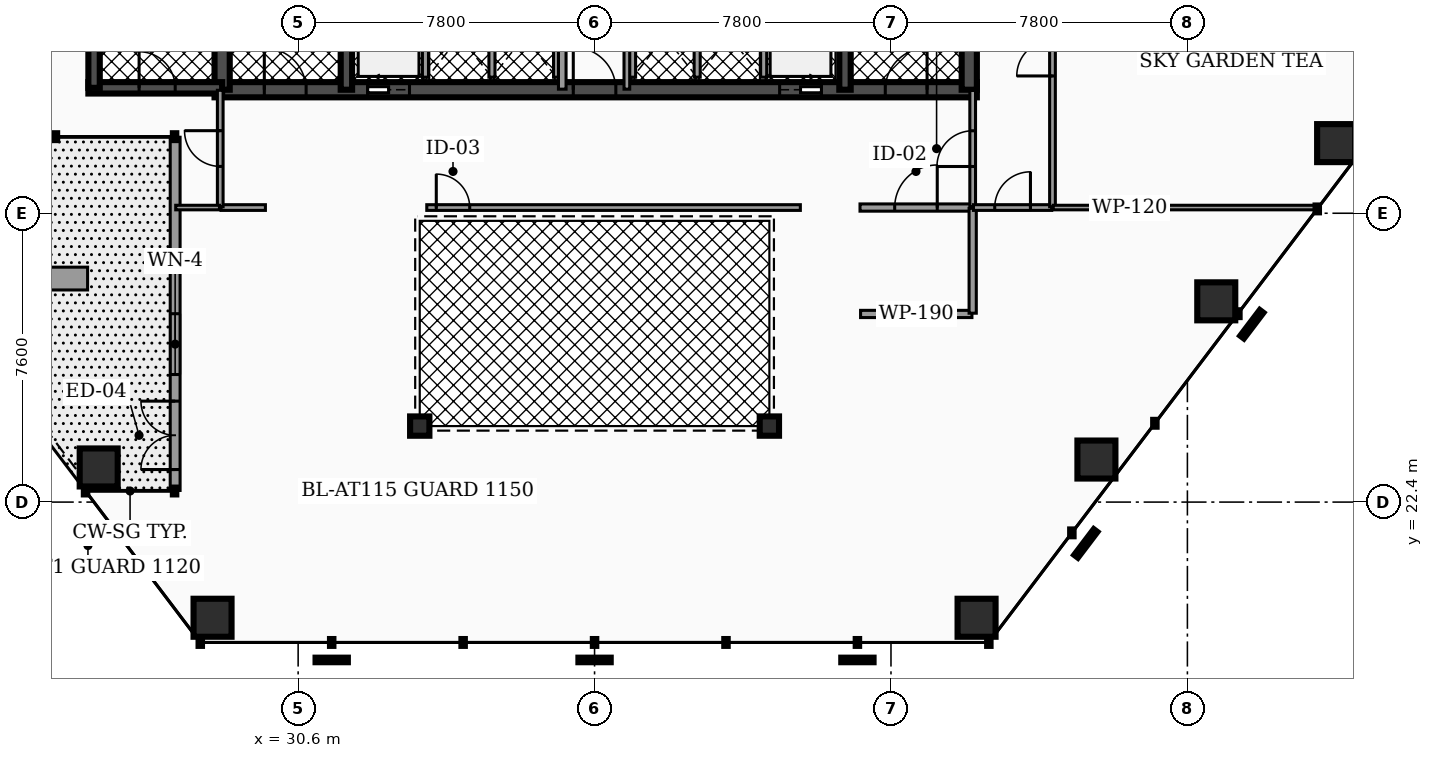
"""IFC4 building model, lengths in metres.
Left out: names, types, materials, properties, quantities, classifications, styles, units other than length and angle.
Written with IfcOpenShell. Run it as: python <this file> out.ifc"""

import sys

from ifc_helpers import new_model, si_unit, direction, frame, frame_2d, origin, origin_2d, place, context, subcontext, project, spatial, rectangle, hollow_rectangle, hollow_circle, extrude, element, fill, save


model = new_model("IFC4")
c1 = context("Model", 3, precision=1e-05, world=origin(), true_north=direction((0.0, 1.0)))
c2 = subcontext(c1, "Body", "Model", "MODEL_VIEW")
j1 = project(units=[si_unit("LENGTHUNIT", "METRE"), si_unit("PLANEANGLEUNIT", "RADIAN")], contexts=[c1])
p1 = place(None, origin())
s1 = spatial("IfcSite", under=j1, at=p1, CompositionType="ELEMENT")
p2 = place(p1, origin())
s2 = spatial("IfcBuilding", under=s1, at=p2, CompositionType="ELEMENT")
p3 = place(p2, frame((0.0, 0.0, 64.26)))
s3 = spatial("IfcBuildingStorey", under=s2, at=p3, CompositionType="ELEMENT", Elevation=64.26)
p4 = place(p3, frame((28.4, 33.25, 0.0), z_axis=(0.0, 0.0, 1.0), x_axis=(1.0, 0.0, 0.0)))
e1 = element("IfcWall", 1, at=p4, inside=s3, PredefinedType="SHEAR", context=c2, shape_type="SweptSolid", body=[
    extrude(rectangle(XDim=20.06, YDim=0.4, at=frame_2d((10.03, 0.0))), origin(), (0.0, 0.0, 1.0), 3.82),
])
p5 = place(p4, frame((4.03, 0.0, 0.0)))
e2 = element("IfcOpeningElement", 2, at=p5, cuts=e1, PredefinedType="OPENING", context=c2, shape_type="SweptSolid", body=[
    extrude(rectangle(XDim=1.1, YDim=2.15, at=frame_2d((0.55, 1.075))), frame((0.0, 0.21, 0.0), z_axis=(0.0, -1.0, 0.0), x_axis=(1.0, 0.0, 0.0)), (0.0, 0.0, 1.0), 0.42),
])
p6 = place(p4, frame((14.87, 0.0, 0.0)))
e3 = element("IfcOpeningElement", 3, at=p6, cuts=e1, PredefinedType="OPENING", context=c2, shape_type="SweptSolid", body=[
    extrude(rectangle(XDim=1.1, YDim=2.15, at=frame_2d((0.55, 1.075))), frame((0.0, 0.21, 0.0), z_axis=(0.0, -1.0, 0.0), x_axis=(1.0, 0.0, 0.0)), (0.0, 0.0, 1.0), 0.42),
])
p7 = place(p4, frame((1.31, 0.0, 0.0)))
e4 = element("IfcOpeningElement", 4, at=p7, cuts=e1, PredefinedType="OPENING", context=c2, shape_type="SweptSolid", body=[
    extrude(rectangle(XDim=1.1, YDim=2.2, at=frame_2d((0.55, 1.1))), frame((0.0, 0.21, 0.0), z_axis=(0.0, -1.0, 0.0), x_axis=(1.0, 0.0, 0.0)), (0.0, 0.0, 1.0), 0.42),
])
p8 = place(p4, frame((9.44, 0.0, 0.0)))
e5 = element("IfcOpeningElement", 5, at=p8, cuts=e1, PredefinedType="OPENING", context=c2, shape_type="SweptSolid", body=[
    extrude(rectangle(XDim=1.12, YDim=2.05, at=frame_2d((0.56, 1.025))), frame((0.0, 0.21, 0.0), z_axis=(0.0, -1.0, 0.0), x_axis=(1.0, 0.0, 0.0)), (0.0, 0.0, 1.0), 0.42),
])
p9 = place(p4, frame((17.65, 0.0, 0.0)))
e6 = element("IfcOpeningElement", 6, at=p9, cuts=e1, PredefinedType="OPENING", context=c2, shape_type="SweptSolid", body=[
    extrude(rectangle(XDim=1.1, YDim=2.2, at=frame_2d((0.55, 1.1))), frame((0.0, 0.21, 0.0), z_axis=(0.0, -1.0, 0.0), x_axis=(1.0, 0.0, 0.0)), (0.0, 0.0, 1.0), 0.42),
])
p10 = place(p3, frame((28.6, 33.25, 0.0), z_axis=(0.0, 0.0, 1.0), x_axis=(0.0, 1.0, 0.0)))
e7 = element("IfcWall", 7, at=p10, inside=s3, PredefinedType="SHEAR", context=c2, shape_type="SweptSolid", body=[
    extrude(rectangle(XDim=10.2, YDim=0.4, at=frame_2d((5.1, 0.0))), origin(), (0.0, 0.0, 1.0), 3.82),
])
for number, where, z_axis, x_axis in (
    (8, (31.87, 33.25, 0.0), (0.0, 0.0, 1.0), (0.0, 1.0, 0.0)),
    (9, (44.99, 33.25, 0.0), (0.0, 0.0, 1.0), (0.0, 1.0, 0.0)),
):
    element("IfcWall", number, at=place(p3, frame(where, z_axis=z_axis, x_axis=x_axis)), inside=s3, PredefinedType="SHEAR", context=c2, shape_type="SweptSolid", body=[
        extrude(rectangle(XDim=10.2, YDim=0.3, at=frame_2d((5.1, 0.0))), origin(), (0.0, 0.0, 1.0), 3.82),
    ])
p11 = place(p3, frame((48.26, 33.25, 0.0), z_axis=(0.0, 0.0, 1.0), x_axis=(0.0, 1.0, 0.0)))
e10 = element("IfcWall", 10, at=p11, inside=s3, PredefinedType="SHEAR", context=c2, shape_type="SweptSolid", body=[
    extrude(rectangle(XDim=10.2, YDim=0.4, at=frame_2d((5.1, 0.0))), origin(), (0.0, 0.0, 1.0), 3.82),
])
p12 = place(p3, frame((25.08, 33.3, 0.0), z_axis=(0.0, 0.0, 1.0), x_axis=(1.0, 0.0, 0.0)))
e11 = element("IfcWall", 11, at=p12, inside=s3, PredefinedType="SHEAR", context=c2, shape_type="SweptSolid", body=[
    extrude(rectangle(XDim=3.52, YDim=0.3, at=frame_2d((1.76, 0.0))), origin(), (0.0, 0.0, 1.0), 3.82),
])
p13 = place(p12, frame((1.335, 0.0, 0.0)))
e12 = element("IfcOpeningElement", 12, at=p13, cuts=e11, PredefinedType="OPENING", context=c2, shape_type="SweptSolid", body=[
    extrude(rectangle(XDim=0.95, YDim=2.2, at=frame_2d((0.475, 1.1))), frame((0.0, 0.16, 0.0), z_axis=(0.0, -1.0, 0.0), x_axis=(1.0, 0.0, 0.0)), (0.0, 0.0, 1.0), 0.32),
])
p14 = place(p3, frame((25.23, 33.3, 0.0), z_axis=(0.0, 0.0, 1.0), x_axis=(0.0, 1.0, 0.0)))
e13 = element("IfcWall", 13, at=p14, inside=s3, PredefinedType="SHEAR", context=c2, shape_type="SweptSolid", body=[
    extrude(rectangle(XDim=7.6, YDim=0.3, at=frame_2d((3.8, 0.0))), origin(), (0.0, 0.0, 1.0), 3.82),
])
p15 = place(p3, frame((25.352, 23.311, 0.0), z_axis=(0.0, 0.0, 1.0), x_axis=(1.0, 0.0, 0.0)))
e14 = element("IfcColumn", 14, at=p15, inside=s3, PredefinedType="COLUMN", context=c2, shape_type="SweptSolid", body=[
    extrude(hollow_rectangle(XDim=1.0, YDim=1.0, WallThickness=0.05, at=origin_2d()), origin(), (0.0, 0.0, 1.0), 4.04),
])
for number, where, z_axis, x_axis in (
    (15, (28.348, 19.356, 0.0), (0.0, 0.0, 1.0), (1.0, 0.0, 0.0)),
    (16, (48.452, 19.356, 0.0), (0.0, 0.0, 1.0), (1.0, 0.0, 0.0)),
    (17, (51.606, 23.519, 0.0), (0.0, 0.0, 1.0), (1.0, 0.0, 0.0)),
    (18, (54.76, 27.682, 0.0), (0.0, 0.0, 1.0), (1.0, 0.0, 0.0)),
    (19, (57.914, 31.845, 0.0), (0.0, 0.0, 1.0), (1.0, 0.0, 0.0)),
):
    element("IfcColumn", number, at=place(p3, frame(where, z_axis=z_axis, x_axis=x_axis)), inside=s3, PredefinedType="COLUMN", context=c2, shape_type="SweptSolid", body=[
        extrude(hollow_rectangle(XDim=1.0, YDim=1.0, WallThickness=0.05, at=origin_2d()), origin(), (0.0, 0.0, 1.0), 3.82),
    ])
for number, where, z_axis, x_axis in (
    (20, (33.8, 24.4, 0.0), (0.0, 0.0, 1.0), (1.0, 0.0, 0.0)),
    (21, (43.0, 24.4, 0.0), (0.0, 0.0, 1.0), (1.0, 0.0, 0.0)),
):
    element("IfcColumn", number, at=place(p3, frame(where, z_axis=z_axis, x_axis=x_axis)), inside=s3, PredefinedType="COLUMN", context=c2, shape_type="SweptSolid", body=[
        extrude(hollow_circle(Radius=0.254, WallThickness=0.02, at=origin_2d()), origin(), (0.0, 0.0, 1.0), 3.82),
    ])
p16 = place(p3, frame((27.364, 22.707, 0.0), z_axis=(0.0, 0.0, 1.0), x_axis=(0.0, 1.0, 0.0)))
e22 = element("IfcWall", 22, at=p16, inside=s3, PredefinedType="STANDARD", context=c2, shape_type="SweptSolid", body=[
    extrude(rectangle(XDim=9.293, YDim=0.26, at=frame_2d((4.647, 0.0))), origin(), (0.0, 0.0, 1.0), 3.65),
])
p17 = place(p16, frame((0.55, 0.0, 0.0)))
e23 = element("IfcOpeningElement", 23, at=p17, cuts=e22, PredefinedType="OPENING", context=c2, shape_type="SweptSolid", body=[
    extrude(rectangle(XDim=1.8, YDim=2.2, at=frame_2d((0.9, 1.1))), frame((0.0, 0.14, 0.0), z_axis=(0.0, -1.0, 0.0), x_axis=(1.0, 0.0, 0.0)), (0.0, 0.0, 1.0), 0.28),
])
p18 = place(p16, frame((3.05, 0.0, 0.75)))
e24 = element("IfcOpeningElement", 24, at=p18, cuts=e22, PredefinedType="OPENING", context=c2, shape_type="SweptSolid", body=[
    extrude(rectangle(XDim=1.6, YDim=1.95, at=frame_2d((0.8, 0.975))), frame((0.0, 0.14, 0.0), z_axis=(0.0, -1.0, 0.0), x_axis=(1.0, 0.0, 0.0)), (0.0, 0.0, 1.0), 0.28),
])
p19 = place(p3, frame((23.06, 28.281, 0.0), z_axis=(0.0, 0.0, 1.0), x_axis=(1.0, 0.0, 0.0)))
e25 = element("IfcWall", 25, at=p19, inside=s3, PredefinedType="PARAPET", context=c2, shape_type="SweptSolid", body=[
    extrude(rectangle(XDim=2.0, YDim=0.6, at=frame_2d((1.0, 0.0))), origin(), (0.0, 0.0, 1.0), 0.6),
])
for number, where, z_axis, x_axis in (
    (26, (33.95, 33.58, 0.0), (0.0, 0.0, 1.0), (0.0, 1.0, 0.0)),
    (27, (42.85, 33.58, 0.0), (0.0, 0.0, 1.0), (0.0, 1.0, 0.0)),
):
    element("IfcWall", number, at=place(p3, frame(where, z_axis=z_axis, x_axis=x_axis)), inside=s3, PredefinedType="SOLIDWALL", context=c2, shape_type="SweptSolid", body=[
        extrude(rectangle(XDim=2.45, YDim=0.16, at=frame_2d((1.225, 0.0))), origin(), (0.0, 0.0, 1.0), 2.792),
    ])
for number, where, z_axis, x_axis in (
    (28, (35.7, 33.58, 0.0), (0.0, 0.0, 1.0), (0.0, 1.0, 0.0)),
    (29, (37.4, 33.58, 0.0), (0.0, 0.0, 1.0), (0.0, 1.0, 0.0)),
    (30, (39.4, 33.58, 0.0), (0.0, 0.0, 1.0), (0.0, 1.0, 0.0)),
    (31, (41.1, 33.58, 0.0), (0.0, 0.0, 1.0), (0.0, 1.0, 0.0)),
):
    element("IfcWall", number, at=place(p3, frame(where, z_axis=z_axis, x_axis=x_axis)), inside=s3, PredefinedType="SOLIDWALL", context=c2, shape_type="SweptSolid", body=[
        extrude(rectangle(XDim=2.25, YDim=0.16, at=frame_2d((1.125, 0.0))), origin(), (0.0, 0.0, 1.0), 2.792),
    ])
p20 = place(p3, frame((37.55, 33.265, 0.0), z_axis=(0.0, 0.0, 1.0), x_axis=(0.0, 1.0, 0.0)))
e32 = element("IfcWall", 32, at=p20, inside=s3, PredefinedType="PARTITIONING", context=c2, shape_type="SweptSolid", body=[
    extrude(rectangle(XDim=4.595, YDim=0.2, at=frame_2d((2.298, 0.0))), origin(), (0.0, 0.0, 1.0), 2.777),
])
p21 = place(p20, frame((3.058, 0.0, 0.0)))
e33 = element("IfcOpeningElement", 33, at=p21, cuts=e32, PredefinedType="OPENING", context=c2, shape_type="SweptSolid", body=[
    extrude(rectangle(XDim=0.88, YDim=2.05, at=frame_2d((0.44, 1.025))), frame((0.0, 0.11, 0.0), z_axis=(0.0, -1.0, 0.0), x_axis=(1.0, 0.0, 0.0)), (0.0, 0.0, 1.0), 0.22),
])
p22 = place(p3, frame((39.25, 33.265, 0.0), z_axis=(0.0, 0.0, 1.0), x_axis=(0.0, 1.0, 0.0)))
e34 = element("IfcWall", 34, at=p22, inside=s3, PredefinedType="PARTITIONING", context=c2, shape_type="SweptSolid", body=[
    extrude(rectangle(XDim=4.595, YDim=0.15, at=frame_2d((2.298, 0.0))), origin(), (0.0, 0.0, 1.0), 2.777),
])
p23 = place(p22, frame((3.028, 0.0, 0.0)))
e35 = element("IfcOpeningElement", 35, at=p23, cuts=e34, PredefinedType="OPENING", context=c2, shape_type="SweptSolid", body=[
    extrude(rectangle(XDim=0.94, YDim=2.05, at=frame_2d((0.47, 1.025))), frame((0.0, 0.085, 0.0), z_axis=(0.0, -1.0, 0.0), x_axis=(1.0, 0.0, 0.0)), (0.0, 0.0, 1.0), 0.17),
])
p24 = place(p3, frame((45.385, 30.15, 0.0), z_axis=(0.0, 0.0, 1.0), x_axis=(1.0, 0.0, 0.0)))
e36 = element("IfcWall", 36, at=p24, inside=s3, PredefinedType="PARTITIONING", context=c2, shape_type="SweptSolid", body=[
    extrude(rectangle(XDim=2.945, YDim=0.19, at=frame_2d((1.473, 0.0))), origin(), (0.0, 0.0, 1.0), 2.777),
])
p25 = place(p24, frame((0.913, 0.0, 0.0)))
e37 = element("IfcOpeningElement", 37, at=p25, cuts=e36, PredefinedType="OPENING", context=c2, shape_type="SweptSolid", body=[
    extrude(rectangle(XDim=1.12, YDim=2.05, at=frame_2d((0.56, 1.025))), frame((0.0, 0.105, 0.0), z_axis=(0.0, -1.0, 0.0), x_axis=(1.0, 0.0, 0.0)), (0.0, 0.0, 1.0), 0.21),
])
p26 = place(p3, frame((48.35, 30.17, 0.0), z_axis=(0.0, 0.0, 1.0), x_axis=(0.0, 1.0, 0.0)))
e38 = element("IfcWall", 38, at=p26, inside=s3, PredefinedType="PARTITIONING", context=c2, shape_type="SweptSolid", body=[
    extrude(rectangle(XDim=3.06, YDim=0.15, at=frame_2d((1.53, 0.0))), origin(), (0.0, 0.0, 1.0), 2.777),
])
p27 = place(p26, frame((1.06, 0.0, 0.0)))
e39 = element("IfcOpeningElement", 39, at=p27, cuts=e38, PredefinedType="OPENING", context=c2, shape_type="SweptSolid", body=[
    extrude(rectangle(XDim=0.94, YDim=2.05, at=frame_2d((0.47, 1.025))), frame((0.0, 0.085, 0.0), z_axis=(0.0, -1.0, 0.0), x_axis=(1.0, 0.0, 0.0)), (0.0, 0.0, 1.0), 0.17),
])
p28 = place(p3, frame((28.57, 30.15, 0.0), z_axis=(0.0, 0.0, 1.0), x_axis=(1.0, 0.0, 0.0)))
e40 = element("IfcWall", 40, at=p28, inside=s3, PredefinedType="PARTITIONING", context=c2, shape_type="SweptSolid", body=[
    extrude(rectangle(XDim=1.168, YDim=0.15, at=frame_2d((0.584, 0.0))), origin(), (0.0, 0.0, 1.0), 2.777),
])
p29 = place(p3, frame((28.55, 30.17, 0.0), z_axis=(0.0, 0.0, 1.0), x_axis=(0.0, 1.0, 0.0)))
e41 = element("IfcWall", 41, at=p29, inside=s3, PredefinedType="PARTITIONING", context=c2, shape_type="SweptSolid", body=[
    extrude(rectangle(XDim=3.065, YDim=0.15, at=frame_2d((1.533, 0.0))), origin(), (0.0, 0.0, 1.0), 2.777),
])
p30 = place(p29, frame((1.062, 0.0, 0.0)))
e42 = element("IfcOpeningElement", 42, at=p30, cuts=e41, PredefinedType="OPENING", context=c2, shape_type="SweptSolid", body=[
    extrude(rectangle(XDim=0.94, YDim=2.05, at=frame_2d((0.47, 1.025))), frame((0.0, 0.085, 0.0), z_axis=(0.0, -1.0, 0.0), x_axis=(1.0, 0.0, 0.0)), (0.0, 0.0, 1.0), 0.17),
])
p31 = place(p3, frame((33.985, 30.15, 0.0), z_axis=(0.0, 0.0, 1.0), x_axis=(1.0, 0.0, 0.0)))
e43 = element("IfcWall", 43, at=p31, inside=s3, PredefinedType="PARTITIONING", context=c2, shape_type="SweptSolid", body=[
    extrude(rectangle(XDim=9.83, YDim=0.15, at=frame_2d((4.915, 0.0))), origin(), (0.0, 0.0, 1.0), 2.777),
])
p32 = place(p31, frame((0.25, 0.0, 0.0)))
e44 = element("IfcOpeningElement", 44, at=p32, cuts=e43, PredefinedType="OPENING", context=c2, shape_type="SweptSolid", body=[
    extrude(rectangle(XDim=0.88, YDim=2.05, at=frame_2d((0.44, 1.025))), frame((0.0, 0.085, 0.0), z_axis=(0.0, -1.0, 0.0), x_axis=(1.0, 0.0, 0.0)), (0.0, 0.0, 1.0), 0.17),
])
p33 = place(p3, frame((45.4, 27.35, 0.0), z_axis=(0.0, 0.0, 1.0), x_axis=(1.0, 0.0, 0.0)))
e45 = element("IfcWall", 45, at=p33, inside=s3, PredefinedType="PARTITIONING", context=c2, shape_type="SweptSolid", body=[
    extrude(rectangle(XDim=2.93, YDim=0.19, at=frame_2d((1.465, 0.0))), origin(), (0.0, 0.0, 1.0), 2.777),
])
p34 = place(p3, frame((48.35, 27.37, 0.0), z_axis=(0.0, 0.0, 1.0), x_axis=(0.0, 1.0, 0.0)))
e46 = element("IfcWall", 46, at=p34, inside=s3, PredefinedType="PARTITIONING", context=c2, shape_type="SweptSolid", body=[
    extrude(rectangle(XDim=2.76, YDim=0.19, at=frame_2d((1.38, 0.0))), origin(), (0.0, 0.0, 1.0), 2.777),
])
p35 = place(p3, frame((48.37, 30.15, 0.0), z_axis=(0.0, 0.0, 1.0), x_axis=(1.0, 0.0, 0.0)))
e47 = element("IfcWall", 47, at=p35, inside=s3, PredefinedType="PARTITIONING", context=c2, shape_type="SweptSolid", body=[
    extrude(rectangle(XDim=2.06, YDim=0.15, at=frame_2d((1.03, 0.0))), origin(), (0.0, 0.0, 1.0), 2.777),
])
p36 = place(p35, frame((0.56, 0.0, 0.0)))
e48 = element("IfcOpeningElement", 48, at=p36, cuts=e47, PredefinedType="OPENING", context=c2, shape_type="SweptSolid", body=[
    extrude(rectangle(XDim=0.94, YDim=2.05, at=frame_2d((0.47, 1.025))), frame((0.0, 0.085, 0.0), z_axis=(0.0, -1.0, 0.0), x_axis=(1.0, 0.0, 0.0)), (0.0, 0.0, 1.0), 0.17),
])
p37 = place(p3, frame((50.45, 30.17, 0.0), z_axis=(0.0, 0.0, 1.0), x_axis=(0.0, 1.0, 0.0)))
e49 = element("IfcWall", 49, at=p37, inside=s3, PredefinedType="PARTITIONING", context=c2, shape_type="SweptSolid", body=[
    extrude(rectangle(XDim=7.825, YDim=0.15, at=frame_2d((3.913, 0.0))), origin(), (0.0, 0.0, 1.0), 2.777),
])
p38 = place(p37, frame((3.442, 0.0, 0.0)))
e50 = element("IfcOpeningElement", 50, at=p38, cuts=e49, PredefinedType="OPENING", context=c2, shape_type="SweptSolid", body=[
    extrude(rectangle(XDim=0.94, YDim=2.05, at=frame_2d((0.47, 1.025))), frame((0.0, 0.085, 0.0), z_axis=(0.0, -1.0, 0.0), x_axis=(1.0, 0.0, 0.0)), (0.0, 0.0, 1.0), 0.17),
])
p39 = place(p3, frame((27.379, 30.15, 0.0), z_axis=(0.0, 0.0, 1.0), x_axis=(1.0, 0.0, 0.0)))
e51 = element("IfcWall", 51, at=p39, inside=s3, PredefinedType="PARTITIONING", context=c2, shape_type="SweptSolid", body=[
    extrude(rectangle(XDim=1.151, YDim=0.12, at=frame_2d((0.576, 0.0))), origin(), (0.0, 0.0, 1.0), 2.777),
])
p40 = place(p3, frame((50.47, 30.15, 0.0), z_axis=(0.0, 0.0, 1.0), x_axis=(1.0, 0.0, 0.0)))
e52 = element("IfcWall", 52, at=p40, inside=s3, PredefinedType="PARTITIONING", context=c2, shape_type="SweptSolid", body=[
    extrude(rectangle(XDim=2.83, YDim=0.12, at=frame_2d((1.415, 0.0))), origin(), (0.0, 0.0, 1.0), 2.777),
])
p41 = place(p3, frame((53.3, 30.15, 0.0), z_axis=(0.0, 0.0, 1.0), x_axis=(1.0, 0.0, 0.0)))
e53 = element("IfcWall", 53, at=p41, inside=s3, PredefinedType="PARTITIONING", context=c2, shape_type="SweptSolid", body=[
    extrude(rectangle(XDim=4.13, YDim=0.12, at=frame_2d((2.065, 0.0))), origin(), (0.0, 0.0, 1.0), 2.777),
])
p42 = place(p17, origin())
e54 = element("IfcDoor", 54, at=p42, inside=s3, OperationType="DOUBLE_DOOR_SINGLE_SWING", PredefinedType="DOOR", context=c2, shape_type="SweptSolid", body=[
    extrude(rectangle(XDim=1.8, YDim=2.2, at=frame_2d((0.9, 1.1))), frame((0.0, 0.025, 0.0), z_axis=(0.0, -1.0, 0.0), x_axis=(1.0, 0.0, 0.0)), (0.0, 0.0, 1.0), 0.05),
])
fill(e23, e54)
p43 = place(p18, origin())
e55 = element("IfcWindow", 55, at=p43, inside=s3, PartitioningType="SINGLE_PANEL", PredefinedType="WINDOW", context=c2, shape_type="SweptSolid", body=[
    extrude(rectangle(XDim=1.6, YDim=1.95, at=frame_2d((0.8, 0.975))), frame((0.0, 0.03, 0.0), z_axis=(0.0, -1.0, 0.0), x_axis=(1.0, 0.0, 0.0)), (0.0, 0.0, 1.0), 0.06),
])
fill(e24, e55)
p44 = place(p5, origin())
e56 = element("IfcDoor", 56, at=p44, inside=s3, OperationType="SLIDING_TO_LEFT", PredefinedType="DOOR", context=c2, shape_type="SweptSolid", body=[
    extrude(rectangle(XDim=1.1, YDim=2.15, at=frame_2d((0.55, 1.075))), frame((0.0, 0.025, 0.0), z_axis=(0.0, -1.0, 0.0), x_axis=(1.0, 0.0, 0.0)), (0.0, 0.0, 1.0), 0.05),
])
fill(e2, e56)
p45 = place(p6, origin())
e57 = element("IfcDoor", 57, at=p45, inside=s3, OperationType="SLIDING_TO_RIGHT", PredefinedType="DOOR", context=c2, shape_type="SweptSolid", body=[
    extrude(rectangle(XDim=1.1, YDim=2.15, at=frame_2d((0.55, 1.075))), frame((0.0, 0.025, 0.0), z_axis=(0.0, -1.0, 0.0), x_axis=(1.0, 0.0, 0.0)), (0.0, 0.0, 1.0), 0.05),
])
fill(e3, e57)
p46 = place(p7, origin())
e58 = element("IfcDoor", 58, at=p46, inside=s3, OperationType="SINGLE_SWING_LEFT", PredefinedType="DOOR", context=c2, shape_type="SweptSolid", body=[
    extrude(rectangle(XDim=1.1, YDim=2.2, at=frame_2d((0.55, 1.1))), frame((0.0, 0.025, 0.0), z_axis=(0.0, -1.0, 0.0), x_axis=(1.0, 0.0, 0.0)), (0.0, 0.0, 1.0), 0.05),
])
fill(e4, e58)
p47 = place(p8, origin())
e59 = element("IfcDoor", 59, at=p47, inside=s3, OperationType="SINGLE_SWING_LEFT", PredefinedType="DOOR", context=c2, shape_type="SweptSolid", body=[
    extrude(rectangle(XDim=1.12, YDim=2.05, at=frame_2d((0.56, 1.025))), frame((0.0, 0.025, 0.0), z_axis=(0.0, -1.0, 0.0), x_axis=(1.0, 0.0, 0.0)), (0.0, 0.0, 1.0), 0.05),
])
fill(e5, e59)
p48 = place(p9, origin())
e60 = element("IfcDoor", 60, at=p48, inside=s3, OperationType="SINGLE_SWING_RIGHT", PredefinedType="DOOR", context=c2, shape_type="SweptSolid", body=[
    extrude(rectangle(XDim=1.1, YDim=2.2, at=frame_2d((0.55, 1.1))), frame((0.0, 0.025, 0.0), z_axis=(0.0, -1.0, 0.0), x_axis=(1.0, 0.0, 0.0)), (0.0, 0.0, 1.0), 0.05),
])
fill(e6, e60)
p49 = place(p13, origin())
e61 = element("IfcDoor", 61, at=p49, inside=s3, OperationType="SINGLE_SWING_LEFT", PredefinedType="DOOR", context=c2, shape_type="SweptSolid", body=[
    extrude(rectangle(XDim=0.95, YDim=2.2, at=frame_2d((0.475, 1.1))), frame((0.0, 0.025, 0.0), z_axis=(0.0, -1.0, 0.0), x_axis=(1.0, 0.0, 0.0)), (0.0, 0.0, 1.0), 0.05),
])
fill(e12, e61)
p50 = place(p25, origin())
e62 = element("IfcDoor", 62, at=p50, inside=s3, OperationType="SINGLE_SWING_RIGHT", PredefinedType="DOOR", context=c2, shape_type="SweptSolid", body=[
    extrude(rectangle(XDim=1.12, YDim=2.05, at=frame_2d((0.56, 1.025))), frame((0.0, 0.025, 0.0), z_axis=(0.0, -1.0, 0.0), x_axis=(1.0, 0.0, 0.0)), (0.0, 0.0, 1.0), 0.05),
])
fill(e37, e62)
p51 = place(p27, origin())
e63 = element("IfcDoor", 63, at=p51, inside=s3, OperationType="SINGLE_SWING_LEFT", PredefinedType="DOOR", context=c2, shape_type="SweptSolid", body=[
    extrude(rectangle(XDim=0.94, YDim=2.05, at=frame_2d((0.47, 1.025))), frame((0.0, 0.025, 0.0), z_axis=(0.0, -1.0, 0.0), x_axis=(1.0, 0.0, 0.0)), (0.0, 0.0, 1.0), 0.05),
])
fill(e39, e63)
p52 = place(p30, origin())
e64 = element("IfcDoor", 64, at=p52, inside=s3, OperationType="SINGLE_SWING_RIGHT", PredefinedType="DOOR", context=c2, shape_type="SweptSolid", body=[
    extrude(rectangle(XDim=0.94, YDim=2.05, at=frame_2d((0.47, 1.025))), frame((0.0, 0.025, 0.0), z_axis=(0.0, -1.0, 0.0), x_axis=(1.0, 0.0, 0.0)), (0.0, 0.0, 1.0), 0.05),
])
fill(e42, e64)
p53 = place(p32, origin())
e65 = element("IfcDoor", 65, at=p53, inside=s3, OperationType="SINGLE_SWING_LEFT", PredefinedType="DOOR", context=c2, shape_type="SweptSolid", body=[
    extrude(rectangle(XDim=0.88, YDim=2.05, at=frame_2d((0.44, 1.025))), frame((0.0, 0.025, 0.0), z_axis=(0.0, -1.0, 0.0), x_axis=(1.0, 0.0, 0.0)), (0.0, 0.0, 1.0), 0.05),
])
fill(e44, e65)
p54 = place(p36, origin())
e66 = element("IfcDoor", 66, at=p54, inside=s3, OperationType="SINGLE_SWING_RIGHT", PredefinedType="DOOR", context=c2, shape_type="SweptSolid", body=[
    extrude(rectangle(XDim=0.94, YDim=2.05, at=frame_2d((0.47, 1.025))), frame((0.0, 0.025, 0.0), z_axis=(0.0, -1.0, 0.0), x_axis=(1.0, 0.0, 0.0)), (0.0, 0.0, 1.0), 0.05),
])
fill(e48, e66)
p55 = place(p38, origin())
e67 = element("IfcDoor", 67, at=p55, inside=s3, OperationType="SINGLE_SWING_LEFT", PredefinedType="DOOR", context=c2, shape_type="SweptSolid", body=[
    extrude(rectangle(XDim=0.94, YDim=2.05, at=frame_2d((0.47, 1.025))), frame((0.0, 0.025, 0.0), z_axis=(0.0, -1.0, 0.0), x_axis=(1.0, 0.0, 0.0)), (0.0, 0.0, 1.0), 0.05),
])
fill(e50, e67)
save(model, sys.argv[1])
